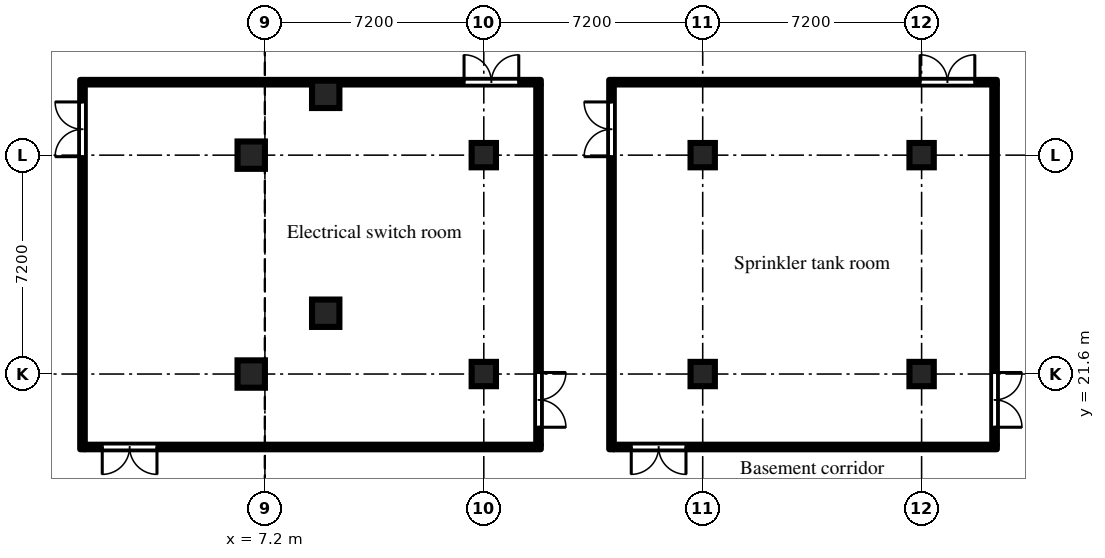
"""IFC4 building model, lengths in metres.
Left out: names, types, materials, properties, quantities, classifications, styles, units other than length and angle.
Written with IfcOpenShell. Run it as: python <this file> out.ifc"""

import sys

from ifc_helpers import new_model, si_unit, direction, frame, frame_2d, origin, origin_2d, place, context, subcontext, project, spatial, rectangle, extrude, element, fill, save


model = new_model("IFC4")
c1 = context("Model", 3, precision=1e-05, world=origin(), true_north=direction((0.0, 1.0)))
c2 = subcontext(c1, "Body", "Model", "MODEL_VIEW")
j1 = project(units=[si_unit("LENGTHUNIT", "METRE"), si_unit("PLANEANGLEUNIT", "RADIAN")], contexts=[c1])
p1 = place(None, origin())
s1 = spatial("IfcSite", under=j1, at=p1, CompositionType="ELEMENT")
p2 = place(p1, origin())
s2 = spatial("IfcBuilding", under=s1, at=p2, CompositionType="ELEMENT")
p3 = place(p2, frame((0.0, 0.0, -4.8)))
s3 = spatial("IfcBuildingStorey", under=s2, at=p3, CompositionType="ELEMENT", Elevation=-4.8)
for number, where, z_axis, x_axis in (
    (1, (6.75, 21.6, -0.5), (0.0, 0.0, 1.0), (1.0, 0.0, 0.0)),
    (2, (6.75, 28.8, -0.5), (0.0, 0.0, 1.0), (1.0, 0.0, 0.0)),
):
    element("IfcColumn", number, at=place(p3, frame(where, z_axis=z_axis, x_axis=x_axis)), inside=s3, PredefinedType="COLUMN", context=c2, shape_type="SweptSolid", body=[
        extrude(rectangle(XDim=0.9, YDim=0.9, at=origin_2d()), origin(), (0.0, 0.0, 1.0), 5.3),
    ])
for number, where, z_axis, x_axis in (
    (3, (14.4, 21.6, -0.5), (0.0, 0.0, 1.0), (1.0, 0.0, 0.0)),
    (4, (14.4, 28.8, -0.5), (0.0, 0.0, 1.0), (1.0, 0.0, 0.0)),
    (5, (21.6, 21.6, -0.5), (0.0, 0.0, 1.0), (1.0, 0.0, 0.0)),
    (6, (21.6, 28.8, -0.5), (0.0, 0.0, 1.0), (1.0, 0.0, 0.0)),
    (7, (28.8, 21.6, -0.5), (0.0, 0.0, 1.0), (1.0, 0.0, 0.0)),
    (8, (28.8, 28.8, -0.5), (0.0, 0.0, 1.0), (1.0, 0.0, 0.0)),
):
    element("IfcColumn", number, at=place(p3, frame(where, z_axis=z_axis, x_axis=x_axis)), inside=s3, PredefinedType="COLUMN", context=c2, shape_type="SweptSolid", body=[
        extrude(rectangle(XDim=0.8, YDim=0.8, at=origin_2d()), origin(), (0.0, 0.0, 1.0), 5.3),
    ])
for number, where, z_axis, x_axis in (
    (9, (9.2, 23.6, -0.5), (0.0, 0.0, 1.0), (1.0, 0.0, 0.0)),
    (10, (9.2, 30.8, -0.5), (0.0, 0.0, 1.0), (1.0, 0.0, 0.0)),
):
    element("IfcColumn", number, at=place(p3, frame(where, z_axis=z_axis, x_axis=x_axis)), inside=s3, PredefinedType="COLUMN", context=c2, shape_type="SweptSolid", body=[
        extrude(rectangle(XDim=0.9, YDim=0.9, at=origin_2d()), origin(), (0.0, 0.0, 1.0), 5.3),
    ])
p4 = place(p3, frame((1.2, 19.125, 0.0), z_axis=(0.0, 0.0, 1.0), x_axis=(0.0, 1.0, 0.0)))
e11 = element("IfcWall", 11, at=p4, inside=s3, PredefinedType="PARTITIONING", context=c2, shape_type="SweptSolid", body=[
    extrude(rectangle(XDim=12.15, YDim=0.15, at=frame_2d((6.075, 0.0))), origin(), (0.0, 0.0, 1.0), 4.35),
])
p5 = place(p4, frame((9.625, 0.0, 0.0)))
e12 = element("IfcOpeningElement", 12, at=p5, cuts=e11, PredefinedType="OPENING", context=c2, shape_type="SweptSolid", body=[
    extrude(rectangle(XDim=1.8, YDim=2.1, at=frame_2d((0.9, 1.05))), frame((0.0, 0.085, 0.0), z_axis=(0.0, -1.0, 0.0), x_axis=(1.0, 0.0, 0.0)), (0.0, 0.0, 1.0), 0.17),
])
p6 = place(p3, frame((1.275, 19.2, 0.0), z_axis=(0.0, 0.0, 1.0), x_axis=(1.0, 0.0, 0.0)))
e13 = element("IfcWall", 13, at=p6, inside=s3, PredefinedType="PARTITIONING", context=c2, shape_type="SweptSolid", body=[
    extrude(rectangle(XDim=15.0, YDim=0.15, at=frame_2d((7.5, 0.0))), origin(), (0.0, 0.0, 1.0), 4.35),
])
p7 = place(p6, frame((0.575, 0.0, 0.0)))
e14 = element("IfcOpeningElement", 14, at=p7, cuts=e13, PredefinedType="OPENING", context=c2, shape_type="SweptSolid", body=[
    extrude(rectangle(XDim=1.8, YDim=2.1, at=frame_2d((0.9, 1.05))), frame((0.0, 0.085, 0.0), z_axis=(0.0, -1.0, 0.0), x_axis=(1.0, 0.0, 0.0)), (0.0, 0.0, 1.0), 0.17),
])
p8 = place(p3, frame((1.275, 31.2, 0.0), z_axis=(0.0, 0.0, 1.0), x_axis=(1.0, 0.0, 0.0)))
e15 = element("IfcWall", 15, at=p8, inside=s3, PredefinedType="PARTITIONING", context=c2, shape_type="SweptSolid", body=[
    extrude(rectangle(XDim=15.0, YDim=0.15, at=frame_2d((7.5, 0.0))), origin(), (0.0, 0.0, 1.0), 4.35),
])
p9 = place(p8, frame((12.475, 0.0, 0.0)))
e16 = element("IfcOpeningElement", 16, at=p9, cuts=e15, PredefinedType="OPENING", context=c2, shape_type="SweptSolid", body=[
    extrude(rectangle(XDim=1.8, YDim=2.1, at=frame_2d((0.9, 1.05))), frame((0.0, 0.085, 0.0), z_axis=(0.0, -1.0, 0.0), x_axis=(1.0, 0.0, 0.0)), (0.0, 0.0, 1.0), 0.17),
])
p10 = place(p3, frame((16.2, 19.275, 0.0), z_axis=(0.0, 0.0, 1.0), x_axis=(0.0, 1.0, 0.0)))
e17 = element("IfcWall", 17, at=p10, inside=s3, PredefinedType="PARTITIONING", context=c2, shape_type="SweptSolid", body=[
    extrude(rectangle(XDim=11.85, YDim=0.15, at=frame_2d((5.925, 0.0))), origin(), (0.0, 0.0, 1.0), 4.35),
])
p11 = place(p10, frame((0.575, 0.0, 0.0)))
e18 = element("IfcOpeningElement", 18, at=p11, cuts=e17, PredefinedType="OPENING", context=c2, shape_type="SweptSolid", body=[
    extrude(rectangle(XDim=1.8, YDim=2.1, at=frame_2d((0.9, 1.05))), frame((0.0, 0.085, 0.0), z_axis=(0.0, -1.0, 0.0), x_axis=(1.0, 0.0, 0.0)), (0.0, 0.0, 1.0), 0.17),
])
p12 = place(p3, frame((18.6, 19.125, 0.0), z_axis=(0.0, 0.0, 1.0), x_axis=(0.0, 1.0, 0.0)))
e19 = element("IfcWall", 19, at=p12, inside=s3, PredefinedType="PARTITIONING", context=c2, shape_type="SweptSolid", body=[
    extrude(rectangle(XDim=12.15, YDim=0.15, at=frame_2d((6.075, 0.0))), origin(), (0.0, 0.0, 1.0), 4.35),
])
p13 = place(p12, frame((9.625, 0.0, 0.0)))
e20 = element("IfcOpeningElement", 20, at=p13, cuts=e19, PredefinedType="OPENING", context=c2, shape_type="SweptSolid", body=[
    extrude(rectangle(XDim=1.8, YDim=2.1, at=frame_2d((0.9, 1.05))), frame((0.0, 0.085, 0.0), z_axis=(0.0, -1.0, 0.0), x_axis=(1.0, 0.0, 0.0)), (0.0, 0.0, 1.0), 0.17),
])
p14 = place(p3, frame((18.675, 19.2, 0.0), z_axis=(0.0, 0.0, 1.0), x_axis=(1.0, 0.0, 0.0)))
e21 = element("IfcWall", 21, at=p14, inside=s3, PredefinedType="PARTITIONING", context=c2, shape_type="SweptSolid", body=[
    extrude(rectangle(XDim=12.6, YDim=0.15, at=frame_2d((6.3, 0.0))), origin(), (0.0, 0.0, 1.0), 4.35),
])
p15 = place(p14, frame((0.575, 0.0, 0.0)))
e22 = element("IfcOpeningElement", 22, at=p15, cuts=e21, PredefinedType="OPENING", context=c2, shape_type="SweptSolid", body=[
    extrude(rectangle(XDim=1.8, YDim=2.1, at=frame_2d((0.9, 1.05))), frame((0.0, 0.085, 0.0), z_axis=(0.0, -1.0, 0.0), x_axis=(1.0, 0.0, 0.0)), (0.0, 0.0, 1.0), 0.17),
])
p16 = place(p3, frame((18.675, 31.2, 0.0), z_axis=(0.0, 0.0, 1.0), x_axis=(1.0, 0.0, 0.0)))
e23 = element("IfcWall", 23, at=p16, inside=s3, PredefinedType="PARTITIONING", context=c2, shape_type="SweptSolid", body=[
    extrude(rectangle(XDim=12.6, YDim=0.15, at=frame_2d((6.3, 0.0))), origin(), (0.0, 0.0, 1.0), 4.35),
])
p17 = place(p16, frame((10.075, 0.0, 0.0)))
e24 = element("IfcOpeningElement", 24, at=p17, cuts=e23, PredefinedType="OPENING", context=c2, shape_type="SweptSolid", body=[
    extrude(rectangle(XDim=1.8, YDim=2.1, at=frame_2d((0.9, 1.05))), frame((0.0, 0.085, 0.0), z_axis=(0.0, -1.0, 0.0), x_axis=(1.0, 0.0, 0.0)), (0.0, 0.0, 1.0), 0.17),
])
p18 = place(p3, frame((31.2, 19.275, 0.0), z_axis=(0.0, 0.0, 1.0), x_axis=(0.0, 1.0, 0.0)))
e25 = element("IfcWall", 25, at=p18, inside=s3, PredefinedType="PARTITIONING", context=c2, shape_type="SweptSolid", body=[
    extrude(rectangle(XDim=11.85, YDim=0.15, at=frame_2d((5.925, 0.0))), origin(), (0.0, 0.0, 1.0), 4.35),
])
p19 = place(p18, frame((0.575, 0.0, 0.0)))
e26 = element("IfcOpeningElement", 26, at=p19, cuts=e25, PredefinedType="OPENING", context=c2, shape_type="SweptSolid", body=[
    extrude(rectangle(XDim=1.8, YDim=2.1, at=frame_2d((0.9, 1.05))), frame((0.0, 0.085, 0.0), z_axis=(0.0, -1.0, 0.0), x_axis=(1.0, 0.0, 0.0)), (0.0, 0.0, 1.0), 0.17),
])
p20 = place(p5, origin())
e27 = element("IfcDoor", 27, at=p20, inside=s3, OperationType="DOUBLE_DOOR_DOUBLE_SWING", PredefinedType="DOOR", context=c2, shape_type="SweptSolid", body=[
    extrude(rectangle(XDim=1.8, YDim=2.1, at=frame_2d((0.9, 1.05))), frame((0.0, 0.025, 0.0), z_axis=(0.0, -1.0, 0.0), x_axis=(1.0, 0.0, 0.0)), (0.0, 0.0, 1.0), 0.05),
])
fill(e12, e27)
p21 = place(p7, frame((1.8, 0.0, 0.0), z_axis=(0.0, 0.0, 1.0), x_axis=(-1.0, 0.0, 0.0)))
e28 = element("IfcDoor", 28, at=p21, inside=s3, OperationType="DOUBLE_DOOR_DOUBLE_SWING", PredefinedType="DOOR", context=c2, shape_type="SweptSolid", body=[
    extrude(rectangle(XDim=1.8, YDim=2.1, at=frame_2d((0.9, 1.05))), frame((0.0, 0.025, 0.0), z_axis=(0.0, -1.0, 0.0), x_axis=(1.0, 0.0, 0.0)), (0.0, 0.0, 1.0), 0.05),
])
fill(e14, e28)
p22 = place(p9, origin())
e29 = element("IfcDoor", 29, at=p22, inside=s3, OperationType="DOUBLE_DOOR_DOUBLE_SWING", PredefinedType="DOOR", context=c2, shape_type="SweptSolid", body=[
    extrude(rectangle(XDim=1.8, YDim=2.1, at=frame_2d((0.9, 1.05))), frame((0.0, 0.025, 0.0), z_axis=(0.0, -1.0, 0.0), x_axis=(1.0, 0.0, 0.0)), (0.0, 0.0, 1.0), 0.05),
])
fill(e16, e29)
p23 = place(p11, frame((1.8, 0.0, 0.0), z_axis=(0.0, 0.0, 1.0), x_axis=(-1.0, 0.0, 0.0)))
e30 = element("IfcDoor", 30, at=p23, inside=s3, OperationType="DOUBLE_DOOR_DOUBLE_SWING", PredefinedType="DOOR", context=c2, shape_type="SweptSolid", body=[
    extrude(rectangle(XDim=1.8, YDim=2.1, at=frame_2d((0.9, 1.05))), frame((0.0, 0.025, 0.0), z_axis=(0.0, -1.0, 0.0), x_axis=(1.0, 0.0, 0.0)), (0.0, 0.0, 1.0), 0.05),
])
fill(e18, e30)
p24 = place(p13, origin())
e31 = element("IfcDoor", 31, at=p24, inside=s3, OperationType="DOUBLE_DOOR_DOUBLE_SWING", PredefinedType="DOOR", context=c2, shape_type="SweptSolid", body=[
    extrude(rectangle(XDim=1.8, YDim=2.1, at=frame_2d((0.9, 1.05))), frame((0.0, 0.025, 0.0), z_axis=(0.0, -1.0, 0.0), x_axis=(1.0, 0.0, 0.0)), (0.0, 0.0, 1.0), 0.05),
])
fill(e20, e31)
p25 = place(p15, frame((1.8, 0.0, 0.0), z_axis=(0.0, 0.0, 1.0), x_axis=(-1.0, 0.0, 0.0)))
e32 = element("IfcDoor", 32, at=p25, inside=s3, OperationType="DOUBLE_DOOR_DOUBLE_SWING", PredefinedType="DOOR", context=c2, shape_type="SweptSolid", body=[
    extrude(rectangle(XDim=1.8, YDim=2.1, at=frame_2d((0.9, 1.05))), frame((0.0, 0.025, 0.0), z_axis=(0.0, -1.0, 0.0), x_axis=(1.0, 0.0, 0.0)), (0.0, 0.0, 1.0), 0.05),
])
fill(e22, e32)
p26 = place(p17, origin())
e33 = element("IfcDoor", 33, at=p26, inside=s3, OperationType="DOUBLE_DOOR_DOUBLE_SWING", PredefinedType="DOOR", context=c2, shape_type="SweptSolid", body=[
    extrude(rectangle(XDim=1.8, YDim=2.1, at=frame_2d((0.9, 1.05))), frame((0.0, 0.025, 0.0), z_axis=(0.0, -1.0, 0.0), x_axis=(1.0, 0.0, 0.0)), (0.0, 0.0, 1.0), 0.05),
])
fill(e24, e33)
p27 = place(p19, frame((1.8, 0.0, 0.0), z_axis=(0.0, 0.0, 1.0), x_axis=(-1.0, 0.0, 0.0)))
e34 = element("IfcDoor", 34, at=p27, inside=s3, OperationType="DOUBLE_DOOR_DOUBLE_SWING", PredefinedType="DOOR", context=c2, shape_type="SweptSolid", body=[
    extrude(rectangle(XDim=1.8, YDim=2.1, at=frame_2d((0.9, 1.05))), frame((0.0, 0.025, 0.0), z_axis=(0.0, -1.0, 0.0), x_axis=(1.0, 0.0, 0.0)), (0.0, 0.0, 1.0), 0.05),
])
fill(e26, e34)
save(model, sys.argv[1])
